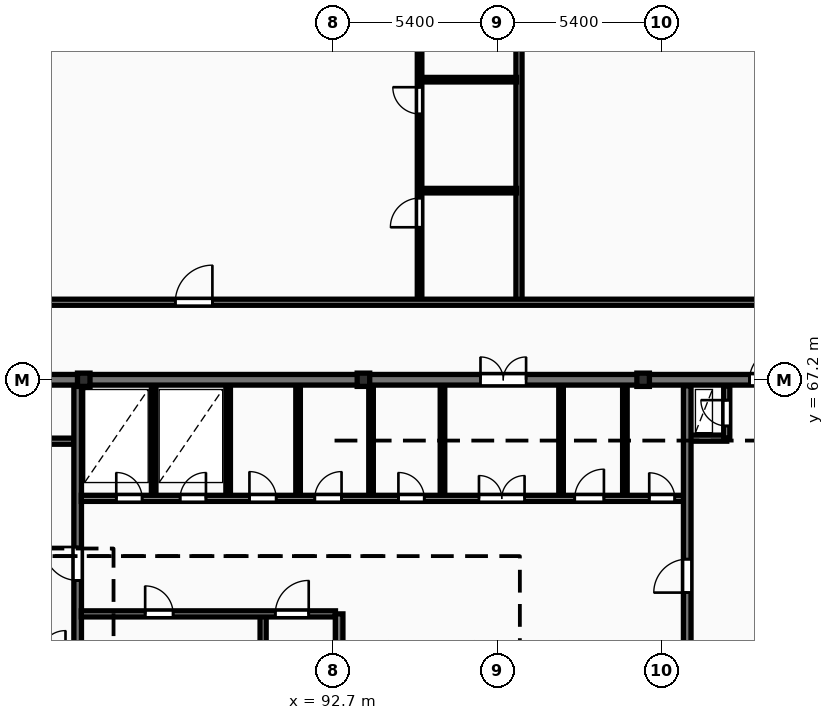
"""IFC4 building model, lengths in metres.
Left out: names, types, materials, properties, quantities, classifications, styles, units other than length and angle.
Written with IfcOpenShell. Run it as: python <this file> out.ifc"""

import sys

from ifc_helpers import new_model, si_unit, direction, frame, frame_2d, origin, origin_2d, place, context, subcontext, project, spatial, rectangle, i_section, extrude, element, fill, save


model = new_model("IFC4")
c1 = context("Model", 3, precision=1e-05, world=origin(), true_north=direction((0.0, 1.0)))
c2 = subcontext(c1, "Body", "Model", "MODEL_VIEW")
j1 = project(units=[si_unit("LENGTHUNIT", "METRE"), si_unit("PLANEANGLEUNIT", "RADIAN")], contexts=[c1])
p1 = place(None, origin())
s1 = spatial("IfcSite", under=j1, at=p1, CompositionType="ELEMENT")
p2 = place(p1, origin())
s2 = spatial("IfcBuilding", under=s1, at=p2, CompositionType="ELEMENT")
p3 = place(p2, frame((0.0, 0.0, 150.1)))
s3 = spatial("IfcBuildingStorey", under=s2, at=p3, CompositionType="ELEMENT", Elevation=150.1)
for number, where, z_axis, x_axis in (
    (1, (84.5, 67.2, 0.0), (0.0, 0.0, 1.0), (1.0, 0.0, 0.0)),
    (2, (93.7, 67.2, 0.0), (0.0, 0.0, 1.0), (1.0, 0.0, 0.0)),
    (3, (102.9, 67.2, 0.0), (0.0, 0.0, 1.0), (1.0, 0.0, 0.0)),
):
    element("IfcColumn", number, at=place(p3, frame(where, z_axis=z_axis, x_axis=x_axis)), inside=s3, PredefinedType="COLUMN", context=c2, shape_type="SweptSolid", body=[
        extrude(i_section(OverallWidth=0.412, OverallDepth=0.437, WebThickness=0.036, FlangeThickness=0.052, FilletRadius=0.015, at=origin_2d()), origin(), (0.0, 0.0, 1.0), 3.6),
    ])
p4 = place(p3, frame((75.95, 67.2, 0.0), z_axis=(0.0, 0.0, 1.0), x_axis=(1.0, 0.0, 0.0)))
e4 = element("IfcWall", 4, at=p4, inside=s3, PredefinedType="SHEAR", context=c2, shape_type="SweptSolid", body=[
    extrude(rectangle(XDim=36.3, YDim=0.35, at=frame_2d((18.15, 0.0))), origin(), (0.0, 0.0, 1.0), 3.6),
])
p5 = place(p4, frame((5.25, 0.0, 0.0)))
e5 = element("IfcOpeningElement", 5, at=p5, cuts=e4, PredefinedType="OPENING", context=c2, shape_type="SweptSolid", body=[
    extrude(rectangle(XDim=1.0, YDim=2.15, at=frame_2d((0.5, 1.075))), frame((0.0, 0.185, 0.0), z_axis=(0.0, -1.0, 0.0), x_axis=(1.0, 0.0, 0.0)), (0.0, 0.0, 1.0), 0.37),
])
p6 = place(p4, frame((21.6, 0.0, 0.0)))
e6 = element("IfcOpeningElement", 6, at=p6, cuts=e4, PredefinedType="OPENING", context=c2, shape_type="SweptSolid", body=[
    extrude(rectangle(XDim=1.5, YDim=2.2, at=frame_2d((0.75, 1.1))), frame((0.0, 0.185, 0.0), z_axis=(0.0, -1.0, 0.0), x_axis=(1.0, 0.0, 0.0)), (0.0, 0.0, 1.0), 0.37),
])
p7 = place(p4, frame((30.45, 0.0, 0.0)))
e7 = element("IfcOpeningElement", 7, at=p7, cuts=e4, PredefinedType="OPENING", context=c2, shape_type="SweptSolid", body=[
    extrude(rectangle(XDim=1.0, YDim=2.15, at=frame_2d((0.5, 1.075))), frame((0.0, 0.185, 0.0), z_axis=(0.0, -1.0, 0.0), x_axis=(1.0, 0.0, 0.0)), (0.0, 0.0, 1.0), 0.37),
])
p8 = place(p3, frame((79.79, 65.18, 0.0), z_axis=(0.0, 0.0, 1.0), x_axis=(1.0, 0.0, 0.0)))
e8 = element("IfcWall", 8, at=p8, inside=s3, PredefinedType="PARTITIONING", context=c2, shape_type="SweptSolid", body=[
    extrude(rectangle(XDim=4.39, YDim=0.2, at=frame_2d((2.195, 0.0))), origin(), (0.0, 0.0, 1.0), 3.31),
])
p9 = place(p8, frame((1.5, 0.0, 0.0)))
e9 = element("IfcOpeningElement", 9, at=p9, cuts=e8, PredefinedType="OPENING", context=c2, shape_type="SweptSolid", body=[
    extrude(rectangle(XDim=1.1, YDim=2.1, at=frame_2d((0.55, 1.05))), frame((0.0, 0.11, 0.0), z_axis=(0.0, -1.0, 0.0), x_axis=(1.0, 0.0, 0.0)), (0.0, 0.0, 1.0), 0.22),
])
p10 = place(p3, frame((84.3, 55.4, 0.0), z_axis=(0.0, 0.0, 1.0), x_axis=(0.0, 1.0, 0.0)))
e10 = element("IfcWall", 10, at=p10, inside=s3, PredefinedType="SHEAR", context=c2, shape_type="SweptSolid", body=[
    extrude(rectangle(XDim=11.6, YDim=0.25, at=frame_2d((5.8, 0.0))), origin(), (0.0, 0.0, 1.0), 3.6),
])
p11 = place(p10, frame((5.2, 0.0, 0.0)))
e11 = element("IfcOpeningElement", 11, at=p11, cuts=e10, PredefinedType="OPENING", context=c2, shape_type="SweptSolid", body=[
    extrude(rectangle(XDim=1.1, YDim=2.1, at=frame_2d((0.55, 1.05))), frame((0.0, 0.135, 0.0), z_axis=(0.0, -1.0, 0.0), x_axis=(1.0, 0.0, 0.0)), (0.0, 0.0, 1.0), 0.27),
])
p12 = place(p3, frame((90.4, 55.4, 0.0), z_axis=(0.0, 0.0, 1.0), x_axis=(0.0, 1.0, 0.0)))
e12 = element("IfcWall", 12, at=p12, inside=s3, PredefinedType="PARTITIONING", context=c2, shape_type="SweptSolid", body=[
    extrude(rectangle(XDim=4.1, YDim=0.2, at=frame_2d((2.05, 0.0))), origin(), (0.0, 0.0, 1.0), 3.31),
])
p13 = place(p3, frame((84.42, 59.5, 0.0), z_axis=(0.0, 0.0, 1.0), x_axis=(1.0, 0.0, 0.0)))
e13 = element("IfcWall", 13, at=p13, inside=s3, PredefinedType="PARTITIONING", context=c2, shape_type="SweptSolid", body=[
    extrude(rectangle(XDim=8.36, YDim=0.2, at=frame_2d((4.18, 0.0))), origin(), (0.0, 0.0, 1.0), 3.31),
])
p14 = place(p13, frame((2.1, 0.0, 0.0)))
e14 = element("IfcOpeningElement", 14, at=p14, cuts=e13, PredefinedType="OPENING", context=c2, shape_type="SweptSolid", body=[
    extrude(rectangle(XDim=0.92, YDim=2.08, at=frame_2d((0.46, 1.04))), frame((0.0, 0.11, 0.0), z_axis=(0.0, -1.0, 0.0), x_axis=(1.0, 0.0, 0.0)), (0.0, 0.0, 1.0), 0.22),
])
p15 = place(p13, frame((6.38, 0.0, 0.0)))
e15 = element("IfcOpeningElement", 15, at=p15, cuts=e13, PredefinedType="OPENING", context=c2, shape_type="SweptSolid", body=[
    extrude(rectangle(XDim=1.1, YDim=2.1, at=frame_2d((0.55, 1.05))), frame((0.0, 0.11, 0.0), z_axis=(0.0, -1.0, 0.0), x_axis=(1.0, 0.0, 0.0)), (0.0, 0.0, 1.0), 0.22),
])
p16 = place(p3, frame((92.9, 55.4, 0.0), z_axis=(0.0, 0.0, 1.0), x_axis=(0.0, 1.0, 0.0)))
e16 = element("IfcWall", 16, at=p16, inside=s3, PredefinedType="SHEAR", context=c2, shape_type="SweptSolid", body=[
    extrude(rectangle(XDim=4.1, YDim=0.25, at=frame_2d((2.05, 0.0))), origin(), (0.0, 0.0, 1.0), 3.6),
])
for number, where, z_axis, x_axis in (
    (17, (86.8, 63.4, 0.0), (0.0, 0.0, 1.0), (0.0, 1.0, 0.0)),
    (18, (89.25, 63.4, 0.0), (0.0, 0.0, 1.0), (0.0, 1.0, 0.0)),
    (19, (91.55, 63.4, 0.0), (0.0, 0.0, 1.0), (0.0, 1.0, 0.0)),
):
    element("IfcWall", number, at=place(p3, frame(where, z_axis=z_axis, x_axis=x_axis)), inside=s3, PredefinedType="PARTITIONING", context=c2, shape_type="SweptSolid", body=[
        extrude(rectangle(XDim=3.6, YDim=0.15, at=frame_2d((1.8, 0.0))), origin(), (0.0, 0.0, 1.0), 3.31),
    ])
p17 = place(p3, frame((93.95, 63.4, 0.0), z_axis=(0.0, 0.0, 1.0), x_axis=(0.0, 1.0, 0.0)))
e20 = element("IfcWall", 20, at=p17, inside=s3, PredefinedType="PARTITIONING", context=c2, shape_type="SweptSolid", body=[
    extrude(rectangle(XDim=3.6, YDim=0.15, at=frame_2d((1.8, 0.0))), origin(), (0.0, 0.0, 1.0), 2.617),
])
for number, where, z_axis, x_axis in (
    (21, (102.3, 63.4, 0.0), (0.0, 0.0, 1.0), (0.0, 1.0, 0.0)),
    (22, (96.3, 63.4, 0.0), (0.0, 0.0, 1.0), (0.0, 1.0, 0.0)),
    (23, (100.2, 63.4, 0.0), (0.0, 0.0, 1.0), (0.0, 1.0, 0.0)),
):
    element("IfcWall", number, at=place(p3, frame(where, z_axis=z_axis, x_axis=x_axis)), inside=s3, PredefinedType="PARTITIONING", context=c2, shape_type="SweptSolid", body=[
        extrude(rectangle(XDim=3.6, YDim=0.15, at=frame_2d((1.8, 0.0))), origin(), (0.0, 0.0, 1.0), 3.31),
    ])
p18 = place(p3, frame((84.42, 63.3, 0.0), z_axis=(0.0, 0.0, 1.0), x_axis=(1.0, 0.0, 0.0)))
e24 = element("IfcWall", 24, at=p18, inside=s3, PredefinedType="PARTITIONING", context=c2, shape_type="SweptSolid", body=[
    extrude(rectangle(XDim=19.83, YDim=0.2, at=frame_2d((9.915, 0.0))), origin(), (0.0, 0.0, 1.0), 3.31),
])
p19 = place(p18, frame((1.15, 0.0, 0.0)))
e25 = element("IfcOpeningElement", 25, at=p19, cuts=e24, PredefinedType="OPENING", context=c2, shape_type="SweptSolid", body=[
    extrude(rectangle(XDim=0.85, YDim=2.05, at=frame_2d((0.425, 1.025))), frame((0.0, 0.11, 0.0), z_axis=(0.0, -1.0, 0.0), x_axis=(1.0, 0.0, 0.0)), (0.0, 0.0, 1.0), 0.22),
])
p20 = place(p18, frame((3.25, 0.0, 0.0)))
e26 = element("IfcOpeningElement", 26, at=p20, cuts=e24, PredefinedType="OPENING", context=c2, shape_type="SweptSolid", body=[
    extrude(rectangle(XDim=0.85, YDim=2.05, at=frame_2d((0.425, 1.025))), frame((0.0, 0.11, 0.0), z_axis=(0.0, -1.0, 0.0), x_axis=(1.0, 0.0, 0.0)), (0.0, 0.0, 1.0), 0.22),
])
p21 = place(p18, frame((13.08, 0.0, 0.0)))
e27 = element("IfcOpeningElement", 27, at=p21, cuts=e24, PredefinedType="OPENING", context=c2, shape_type="SweptSolid", body=[
    extrude(rectangle(XDim=1.5, YDim=2.2, at=frame_2d((0.75, 1.1))), frame((0.0, 0.11, 0.0), z_axis=(0.0, -1.0, 0.0), x_axis=(1.0, 0.0, 0.0)), (0.0, 0.0, 1.0), 0.22),
])
p22 = place(p18, frame((5.53, 0.0, 0.0)))
e28 = element("IfcOpeningElement", 28, at=p22, cuts=e24, PredefinedType="OPENING", context=c2, shape_type="SweptSolid", body=[
    extrude(rectangle(XDim=0.88, YDim=2.06, at=frame_2d((0.44, 1.03))), frame((0.0, 0.11, 0.0), z_axis=(0.0, -1.0, 0.0), x_axis=(1.0, 0.0, 0.0)), (0.0, 0.0, 1.0), 0.22),
])
p23 = place(p18, frame((7.68, 0.0, 0.0)))
e29 = element("IfcOpeningElement", 29, at=p23, cuts=e24, PredefinedType="OPENING", context=c2, shape_type="SweptSolid", body=[
    extrude(rectangle(XDim=0.88, YDim=2.06, at=frame_2d((0.44, 1.03))), frame((0.0, 0.11, 0.0), z_axis=(0.0, -1.0, 0.0), x_axis=(1.0, 0.0, 0.0)), (0.0, 0.0, 1.0), 0.22),
])
p24 = place(p18, frame((10.43, 0.0, 0.0)))
e30 = element("IfcOpeningElement", 30, at=p24, cuts=e24, PredefinedType="OPENING", context=c2, shape_type="SweptSolid", body=[
    extrude(rectangle(XDim=0.85, YDim=2.05, at=frame_2d((0.425, 1.025))), frame((0.0, 0.11, 0.0), z_axis=(0.0, -1.0, 0.0), x_axis=(1.0, 0.0, 0.0)), (0.0, 0.0, 1.0), 0.22),
])
p25 = place(p18, frame((16.23, 0.0, 0.0)))
e31 = element("IfcOpeningElement", 31, at=p25, cuts=e24, PredefinedType="OPENING", context=c2, shape_type="SweptSolid", body=[
    extrude(rectangle(XDim=0.96, YDim=2.1, at=frame_2d((0.48, 1.05))), frame((0.0, 0.11, 0.0), z_axis=(0.0, -1.0, 0.0), x_axis=(1.0, 0.0, 0.0)), (0.0, 0.0, 1.0), 0.22),
])
p26 = place(p18, frame((18.68, 0.0, 0.0)))
e32 = element("IfcOpeningElement", 32, at=p26, cuts=e24, PredefinedType="OPENING", context=c2, shape_type="SweptSolid", body=[
    extrude(rectangle(XDim=0.84, YDim=2.04, at=frame_2d((0.42, 1.02))), frame((0.0, 0.11, 0.0), z_axis=(0.0, -1.0, 0.0), x_axis=(1.0, 0.0, 0.0)), (0.0, 0.0, 1.0), 0.22),
])
p27 = place(p3, frame((104.45, 65.28, 0.0), z_axis=(0.0, 0.0, 1.0), x_axis=(1.0, 0.0, 0.0)))
e33 = element("IfcWall", 33, at=p27, inside=s3, PredefinedType="PARTITIONING", context=c2, shape_type="SweptSolid", body=[
    extrude(rectangle(XDim=1.2, YDim=0.2, at=frame_2d((0.6, 0.0))), origin(), (0.0, 0.0, 1.0), 3.31),
])
p28 = place(p3, frame((105.65, 65.28, 0.0), z_axis=(0.0, 0.0, 1.0), x_axis=(0.0, 1.0, 0.0)))
e34 = element("IfcWall", 34, at=p28, inside=s3, PredefinedType="PARTITIONING", context=c2, shape_type="SweptSolid", body=[
    extrude(rectangle(XDim=1.72, YDim=0.2, at=frame_2d((0.86, 0.0))), origin(), (0.0, 0.0, 1.0), 3.31),
])
p29 = place(p28, frame((0.4, 0.0, 0.0)))
e35 = element("IfcOpeningElement", 35, at=p29, cuts=e34, PredefinedType="OPENING", context=c2, shape_type="SweptSolid", body=[
    extrude(rectangle(XDim=0.85, YDim=2.05, at=frame_2d((0.425, 1.025))), frame((0.0, 0.11, 0.0), z_axis=(0.0, -1.0, 0.0), x_axis=(1.0, 0.0, 0.0)), (0.0, 0.0, 1.0), 0.22),
])
p30 = place(p3, frame((104.35, 58.4, 0.0), z_axis=(0.0, 0.0, 1.0), x_axis=(0.0, 1.0, 0.0)))
e36 = element("IfcWall", 36, at=p30, inside=s3, PredefinedType="SHEAR", context=c2, shape_type="SweptSolid", body=[
    extrude(rectangle(XDim=8.6, YDim=0.25, at=frame_2d((4.3, 0.0))), origin(), (0.0, 0.0, 1.0), 3.6),
])
p31 = place(p30, frame((1.8, 0.0, 0.0)))
e37 = element("IfcOpeningElement", 37, at=p31, cuts=e36, PredefinedType="OPENING", context=c2, shape_type="SweptSolid", body=[
    extrude(rectangle(XDim=1.1, YDim=2.1, at=frame_2d((0.55, 1.05))), frame((0.0, 0.135, 0.0), z_axis=(0.0, -1.0, 0.0), x_axis=(1.0, 0.0, 0.0)), (0.0, 0.0, 1.0), 0.27),
])
p32 = place(p3, frame((98.816, 69.83, 0.0), z_axis=(0.0, 0.0, 1.0), x_axis=(0.0, 1.0, 0.0)))
e38 = element("IfcWall", 38, at=p32, inside=s3, PredefinedType="PARTITIONING", context=c2, shape_type="SweptSolid", body=[
    extrude(rectangle(XDim=26.07, YDim=0.2, at=frame_2d((13.035, 0.0))), origin(), (0.0, 0.0, 1.0), 3.31),
])
for number, where, z_axis, x_axis in (
    (39, (95.606, 73.42, 0.0), (0.0, 0.0, 1.0), (1.0, 0.0, 0.0)),
    (40, (95.606, 77.07, 0.0), (0.0, 0.0, 1.0), (1.0, 0.0, 0.0)),
):
    element("IfcWall", number, at=place(p3, frame(where, z_axis=z_axis, x_axis=x_axis)), inside=s3, PredefinedType="PARTITIONING", context=c2, shape_type="SweptSolid", body=[
        extrude(rectangle(XDim=3.13, YDim=0.15, at=frame_2d((1.565, 0.0))), origin(), (0.0, 0.0, 1.0), 3.31),
    ])
p33 = place(p3, frame((95.546, 69.81, 0.0), z_axis=(0.0, 0.0, 1.0), x_axis=(0.0, 1.0, 0.0)))
e41 = element("IfcWall", 41, at=p33, inside=s3, PredefinedType="PARTITIONING", context=c2, shape_type="SweptSolid", body=[
    extrude(rectangle(XDim=21.48, YDim=0.15, at=frame_2d((10.74, 0.0))), origin(), (0.0, 0.0, 1.0), 3.31),
])
p34 = place(p33, frame((2.406, 0.0, 0.0)))
e42 = element("IfcOpeningElement", 42, at=p34, cuts=e41, PredefinedType="OPENING", context=c2, shape_type="SweptSolid", body=[
    extrude(rectangle(XDim=0.96, YDim=2.1, at=frame_2d((0.48, 1.05))), frame((0.0, 0.085, 0.0), z_axis=(0.0, -1.0, 0.0), x_axis=(1.0, 0.0, 0.0)), (0.0, 0.0, 1.0), 0.17),
])
p35 = place(p33, frame((6.133, 0.0, 0.0)))
e43 = element("IfcOpeningElement", 43, at=p35, cuts=e41, PredefinedType="OPENING", context=c2, shape_type="SweptSolid", body=[
    extrude(rectangle(XDim=0.88, YDim=2.06, at=frame_2d((0.44, 1.03))), frame((0.0, 0.085, 0.0), z_axis=(0.0, -1.0, 0.0), x_axis=(1.0, 0.0, 0.0)), (0.0, 0.0, 1.0), 0.17),
])
p36 = place(p33, frame((11.336, 0.0, 0.0)))
e44 = element("IfcOpeningElement", 44, at=p36, cuts=e41, PredefinedType="OPENING", context=c2, shape_type="SweptSolid", body=[
    extrude(rectangle(XDim=0.84, YDim=2.04, at=frame_2d((0.42, 1.02))), frame((0.0, 0.085, 0.0), z_axis=(0.0, -1.0, 0.0), x_axis=(1.0, 0.0, 0.0)), (0.0, 0.0, 1.0), 0.17),
])
p37 = place(p3, frame((57.6, 69.75, 0.0), z_axis=(0.0, 0.0, 1.0), x_axis=(1.0, 0.0, 0.0)))
e45 = element("IfcWall", 45, at=p37, inside=s3, PredefinedType="PARTITIONING", context=c2, shape_type="SweptSolid", body=[
    extrude(rectangle(XDim=73.0, YDim=0.2, at=frame_2d((36.5, 0.0))), origin(), (0.0, 0.0, 1.0), 3.31),
])
p38 = place(p37, frame((9.189, 0.0, 0.0)))
e46 = element("IfcOpeningElement", 46, at=p38, cuts=e45, PredefinedType="OPENING", context=c2, shape_type="SweptSolid", body=[
    extrude(rectangle(XDim=1.22, YDim=2.18, at=frame_2d((0.61, 1.09))), frame((0.0, 0.11, 0.0), z_axis=(0.0, -1.0, 0.0), x_axis=(1.0, 0.0, 0.0)), (0.0, 0.0, 1.0), 0.22),
])
p39 = place(p37, frame((29.912, 0.0, 0.0)))
e47 = element("IfcOpeningElement", 47, at=p39, cuts=e45, PredefinedType="OPENING", context=c2, shape_type="SweptSolid", body=[
    extrude(rectangle(XDim=1.22, YDim=2.18, at=frame_2d((0.61, 1.09))), frame((0.0, 0.11, 0.0), z_axis=(0.0, -1.0, 0.0), x_axis=(1.0, 0.0, 0.0)), (0.0, 0.0, 1.0), 0.22),
])
p40 = place(p37, frame((49.457, 0.0, 0.0)))
e48 = element("IfcOpeningElement", 48, at=p40, cuts=e45, PredefinedType="OPENING", context=c2, shape_type="SweptSolid", body=[
    extrude(rectangle(XDim=1.22, YDim=2.18, at=frame_2d((0.61, 1.09))), frame((0.0, 0.11, 0.0), z_axis=(0.0, -1.0, 0.0), x_axis=(1.0, 0.0, 0.0)), (0.0, 0.0, 1.0), 0.22),
])
p41 = place(p37, frame((63.122, 0.0, 0.0)))
e49 = element("IfcOpeningElement", 49, at=p41, cuts=e45, PredefinedType="OPENING", context=c2, shape_type="SweptSolid", body=[
    extrude(rectangle(XDim=0.95, YDim=2.15, at=frame_2d((0.475, 1.075))), frame((0.0, 0.11, 0.0), z_axis=(0.0, -1.0, 0.0), x_axis=(1.0, 0.0, 0.0)), (0.0, 0.0, 1.0), 0.22),
])
p42 = place(p6, origin())
e50 = element("IfcDoor", 50, at=p42, inside=s3, OperationType="DOUBLE_DOOR_SINGLE_SWING", PredefinedType="DOOR", context=c2, shape_type="SweptSolid", body=[
    extrude(rectangle(XDim=1.5, YDim=2.2, at=frame_2d((0.75, 1.1))), frame((0.0, 0.025, 0.0), z_axis=(0.0, -1.0, 0.0), x_axis=(1.0, 0.0, 0.0)), (0.0, 0.0, 1.0), 0.05),
])
fill(e6, e50)
p43 = place(p7, origin())
e51 = element("IfcDoor", 51, at=p43, inside=s3, OperationType="SINGLE_SWING_RIGHT", PredefinedType="DOOR", context=c2, shape_type="SweptSolid", body=[
    extrude(rectangle(XDim=1.0, YDim=2.15, at=frame_2d((0.5, 1.075))), frame((0.0, 0.025, 0.0), z_axis=(0.0, -1.0, 0.0), x_axis=(1.0, 0.0, 0.0)), (0.0, 0.0, 1.0), 0.05),
])
fill(e7, e51)
p44 = place(p11, origin())
e52 = element("IfcDoor", 52, at=p44, inside=s3, OperationType="SINGLE_SWING_RIGHT", PredefinedType="DOOR", context=c2, shape_type="SweptSolid", body=[
    extrude(rectangle(XDim=1.1, YDim=2.1, at=frame_2d((0.55, 1.05))), frame((0.0, 0.025, 0.0), z_axis=(0.0, -1.0, 0.0), x_axis=(1.0, 0.0, 0.0)), (0.0, 0.0, 1.0), 0.05),
])
fill(e11, e52)
p45 = place(p14, origin())
e53 = element("IfcDoor", 53, at=p45, inside=s3, OperationType="SINGLE_SWING_LEFT", PredefinedType="DOOR", context=c2, shape_type="SweptSolid", body=[
    extrude(rectangle(XDim=0.92, YDim=2.08, at=frame_2d((0.46, 1.04))), frame((0.0, 0.025, 0.0), z_axis=(0.0, -1.0, 0.0), x_axis=(1.0, 0.0, 0.0)), (0.0, 0.0, 1.0), 0.05),
])
fill(e14, e53)
p46 = place(p15, origin())
e54 = element("IfcDoor", 54, at=p46, inside=s3, OperationType="SINGLE_SWING_RIGHT", PredefinedType="DOOR", context=c2, shape_type="SweptSolid", body=[
    extrude(rectangle(XDim=1.1, YDim=2.1, at=frame_2d((0.55, 1.05))), frame((0.0, 0.025, 0.0), z_axis=(0.0, -1.0, 0.0), x_axis=(1.0, 0.0, 0.0)), (0.0, 0.0, 1.0), 0.05),
])
fill(e15, e54)
p47 = place(p19, origin())
e55 = element("IfcDoor", 55, at=p47, inside=s3, OperationType="SINGLE_SWING_LEFT", PredefinedType="DOOR", context=c2, shape_type="SweptSolid", body=[
    extrude(rectangle(XDim=0.85, YDim=2.05, at=frame_2d((0.425, 1.025))), frame((0.0, 0.025, 0.0), z_axis=(0.0, -1.0, 0.0), x_axis=(1.0, 0.0, 0.0)), (0.0, 0.0, 1.0), 0.05),
])
fill(e25, e55)
p48 = place(p20, origin())
e56 = element("IfcDoor", 56, at=p48, inside=s3, OperationType="SINGLE_SWING_RIGHT", PredefinedType="DOOR", context=c2, shape_type="SweptSolid", body=[
    extrude(rectangle(XDim=0.85, YDim=2.05, at=frame_2d((0.425, 1.025))), frame((0.0, 0.025, 0.0), z_axis=(0.0, -1.0, 0.0), x_axis=(1.0, 0.0, 0.0)), (0.0, 0.0, 1.0), 0.05),
])
fill(e26, e56)
p49 = place(p21, origin())
e57 = element("IfcDoor", 57, at=p49, inside=s3, OperationType="DOUBLE_DOOR_SINGLE_SWING", PredefinedType="DOOR", context=c2, shape_type="SweptSolid", body=[
    extrude(rectangle(XDim=1.5, YDim=2.2, at=frame_2d((0.75, 1.1))), frame((0.0, 0.025, 0.0), z_axis=(0.0, -1.0, 0.0), x_axis=(1.0, 0.0, 0.0)), (0.0, 0.0, 1.0), 0.05),
])
fill(e27, e57)
p50 = place(p22, origin())
e58 = element("IfcDoor", 58, at=p50, inside=s3, OperationType="SINGLE_SWING_LEFT", PredefinedType="DOOR", context=c2, shape_type="SweptSolid", body=[
    extrude(rectangle(XDim=0.88, YDim=2.06, at=frame_2d((0.44, 1.03))), frame((0.0, 0.025, 0.0), z_axis=(0.0, -1.0, 0.0), x_axis=(1.0, 0.0, 0.0)), (0.0, 0.0, 1.0), 0.05),
])
fill(e28, e58)
p51 = place(p23, origin())
e59 = element("IfcDoor", 59, at=p51, inside=s3, OperationType="SINGLE_SWING_RIGHT", PredefinedType="DOOR", context=c2, shape_type="SweptSolid", body=[
    extrude(rectangle(XDim=0.88, YDim=2.06, at=frame_2d((0.44, 1.03))), frame((0.0, 0.025, 0.0), z_axis=(0.0, -1.0, 0.0), x_axis=(1.0, 0.0, 0.0)), (0.0, 0.0, 1.0), 0.05),
])
fill(e29, e59)
p52 = place(p24, origin())
e60 = element("IfcDoor", 60, at=p52, inside=s3, OperationType="SINGLE_SWING_LEFT", PredefinedType="DOOR", context=c2, shape_type="SweptSolid", body=[
    extrude(rectangle(XDim=0.85, YDim=2.05, at=frame_2d((0.425, 1.025))), frame((0.0, 0.025, 0.0), z_axis=(0.0, -1.0, 0.0), x_axis=(1.0, 0.0, 0.0)), (0.0, 0.0, 1.0), 0.05),
])
fill(e30, e60)
p53 = place(p25, origin())
e61 = element("IfcDoor", 61, at=p53, inside=s3, OperationType="SINGLE_SWING_RIGHT", PredefinedType="DOOR", context=c2, shape_type="SweptSolid", body=[
    extrude(rectangle(XDim=0.96, YDim=2.1, at=frame_2d((0.48, 1.05))), frame((0.0, 0.025, 0.0), z_axis=(0.0, -1.0, 0.0), x_axis=(1.0, 0.0, 0.0)), (0.0, 0.0, 1.0), 0.05),
])
fill(e31, e61)
p54 = place(p26, origin())
e62 = element("IfcDoor", 62, at=p54, inside=s3, OperationType="SINGLE_SWING_LEFT", PredefinedType="DOOR", context=c2, shape_type="SweptSolid", body=[
    extrude(rectangle(XDim=0.84, YDim=2.04, at=frame_2d((0.42, 1.02))), frame((0.0, 0.025, 0.0), z_axis=(0.0, -1.0, 0.0), x_axis=(1.0, 0.0, 0.0)), (0.0, 0.0, 1.0), 0.05),
])
fill(e32, e62)
p55 = place(p29, origin())
e63 = element("IfcDoor", 63, at=p55, inside=s3, OperationType="SINGLE_SWING_RIGHT", PredefinedType="DOOR", context=c2, shape_type="SweptSolid", body=[
    extrude(rectangle(XDim=0.85, YDim=2.05, at=frame_2d((0.425, 1.025))), frame((0.0, 0.025, 0.0), z_axis=(0.0, -1.0, 0.0), x_axis=(1.0, 0.0, 0.0)), (0.0, 0.0, 1.0), 0.05),
])
fill(e35, e63)
p56 = place(p31, origin())
e64 = element("IfcDoor", 64, at=p56, inside=s3, OperationType="SINGLE_SWING_LEFT", PredefinedType="DOOR", context=c2, shape_type="SweptSolid", body=[
    extrude(rectangle(XDim=1.1, YDim=2.1, at=frame_2d((0.55, 1.05))), frame((0.0, 0.025, 0.0), z_axis=(0.0, -1.0, 0.0), x_axis=(1.0, 0.0, 0.0)), (0.0, 0.0, 1.0), 0.05),
])
fill(e37, e64)
p57 = place(p34, origin())
e65 = element("IfcDoor", 65, at=p57, inside=s3, OperationType="SINGLE_SWING_LEFT", PredefinedType="DOOR", context=c2, shape_type="SweptSolid", body=[
    extrude(rectangle(XDim=0.96, YDim=2.1, at=frame_2d((0.48, 1.05))), frame((0.0, 0.025, 0.0), z_axis=(0.0, -1.0, 0.0), x_axis=(1.0, 0.0, 0.0)), (0.0, 0.0, 1.0), 0.05),
])
fill(e42, e65)
p58 = place(p35, origin())
e66 = element("IfcDoor", 66, at=p58, inside=s3, OperationType="SINGLE_SWING_RIGHT", PredefinedType="DOOR", context=c2, shape_type="SweptSolid", body=[
    extrude(rectangle(XDim=0.88, YDim=2.06, at=frame_2d((0.44, 1.03))), frame((0.0, 0.025, 0.0), z_axis=(0.0, -1.0, 0.0), x_axis=(1.0, 0.0, 0.0)), (0.0, 0.0, 1.0), 0.05),
])
fill(e43, e66)
p59 = place(p39, origin())
e67 = element("IfcDoor", 67, at=p59, inside=s3, OperationType="SINGLE_SWING_RIGHT", PredefinedType="DOOR", context=c2, shape_type="SweptSolid", body=[
    extrude(rectangle(XDim=1.22, YDim=2.18, at=frame_2d((0.61, 1.09))), frame((0.0, 0.025, 0.0), z_axis=(0.0, -1.0, 0.0), x_axis=(1.0, 0.0, 0.0)), (0.0, 0.0, 1.0), 0.05),
])
fill(e47, e67)
save(model, sys.argv[1])
